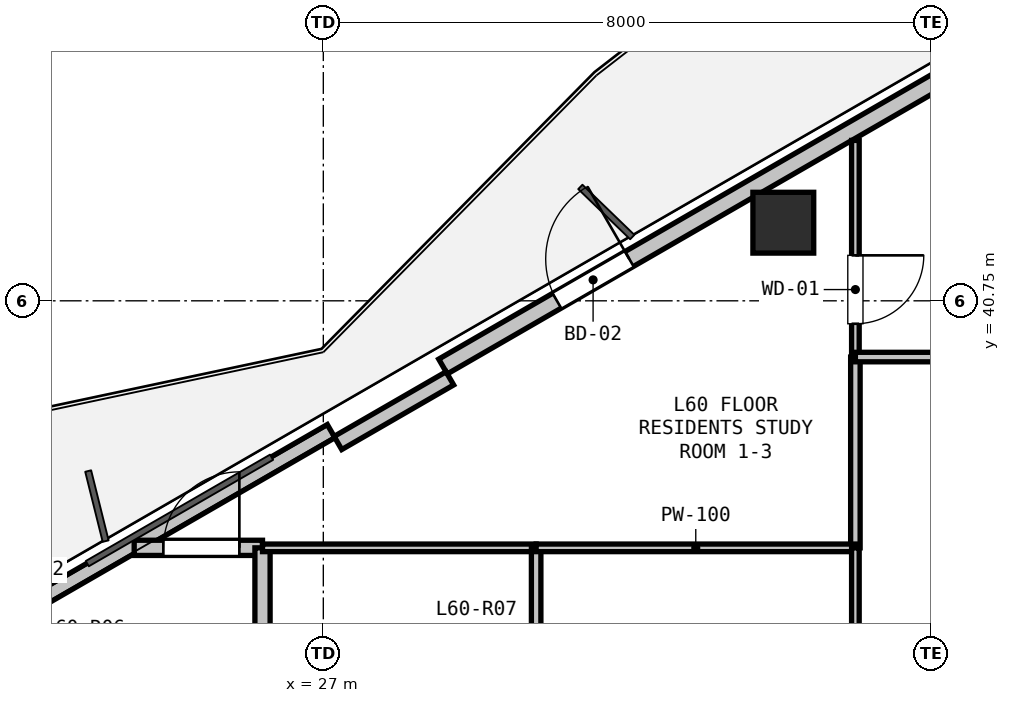
"""IFC4 building model, lengths in metres.
Left out: names, types, materials, properties, quantities, classifications, styles, units other than length and angle.
Written with IfcOpenShell. Run it as: python <this file> out.ifc"""

import sys

from ifc_helpers import new_model, si_unit, direction, frame, frame_2d, origin, origin_2d, place, context, subcontext, project, spatial, rectangle, hollow_rectangle, extrude, element, fill, save


model = new_model("IFC4")
c1 = context("Model", 3, precision=1e-05, world=origin(), true_north=direction((0.0, 1.0)))
c2 = subcontext(c1, "Body", "Model", "MODEL_VIEW")
j1 = project(units=[si_unit("LENGTHUNIT", "METRE"), si_unit("PLANEANGLEUNIT", "RADIAN")], contexts=[c1])
p1 = place(None, origin())
s1 = spatial("IfcSite", under=j1, at=p1, CompositionType="ELEMENT")
p2 = place(p1, origin())
s2 = spatial("IfcBuilding", under=s1, at=p2, CompositionType="ELEMENT")
p3 = place(p2, frame((0.0, 0.0, 215.1)))
s3 = spatial("IfcBuildingStorey", under=s2, at=p3, CompositionType="ELEMENT", Elevation=215.1)
p4 = place(p3, frame((33.052, 41.778, 0.0), z_axis=(0.0, 0.0, 1.0), x_axis=(1.0, 0.0, 0.0)))
e1 = element("IfcColumn", 1, at=p4, inside=s3, PredefinedType="COLUMN", context=c2, shape_type="SweptSolid", body=[
    extrude(hollow_rectangle(XDim=0.8, YDim=0.8, WallThickness=0.025, at=origin_2d()), origin(), (0.0, 0.0, 1.0), 3.3),
])
p5 = place(p3, frame((19.309, 34.536, 0.0), z_axis=(0.0, 0.0, 1.0), x_axis=(0.866020680503, 0.500008180874, 0.0)))
e2 = element("IfcWall", 2, at=p5, inside=s3, PredefinedType="PARAPET", context=c2, shape_type="SweptSolid", body=[
    extrude(rectangle(XDim=8.999, YDim=0.2, at=frame_2d((4.5, 0.0))), origin(), (0.0, 0.0, 1.0), 0.2),
])
p6 = place(p3, frame((28.575, 39.885, 0.0), z_axis=(0.0, 0.0, 1.0), x_axis=(0.866016233231, 0.500015883528, 0.0)))
e3 = element("IfcWall", 3, at=p6, inside=s3, PredefinedType="SOLIDWALL", context=c2, shape_type="SweptSolid", body=[
    extrude(rectangle(XDim=9.699, YDim=0.225, at=frame_2d((4.85, 0.0))), origin(), (0.0, 0.0, 1.0), 2.64),
])
p7 = place(p6, frame((1.73, 0.0, 0.0)))
e4 = element("IfcOpeningElement", 4, at=p7, cuts=e3, PredefinedType="OPENING", context=c2, shape_type="SweptSolid", body=[
    extrude(rectangle(XDim=1.1, YDim=2.1, at=frame_2d((0.55, 1.05))), frame((0.0, 0.123, 0.0), z_axis=(0.0, -1.0, 0.0), x_axis=(1.0, 0.0, 0.0)), (0.0, 0.0, 1.0), 0.245),
])
p8 = place(p3, frame((27.192, 38.88, 0.0), z_axis=(0.0, 0.0, 1.0), x_axis=(0.866025371046, 0.500000056704, 0.0)))
e5 = element("IfcWall", 5, at=p8, inside=s3, PredefinedType="PARAPET", context=c2, shape_type="SweptSolid", body=[
    extrude(rectangle(XDim=1.7, YDim=0.2, at=frame_2d((0.85, 0.0))), origin(), (0.0, 0.0, 1.0), 2.64),
])
p9 = place(p3, frame((24.512, 37.5, 0.0), z_axis=(0.0, 0.0, 1.0), x_axis=(1.0, 0.0, 0.0)))
e6 = element("IfcWall", 6, at=p9, inside=s3, PredefinedType="PARTITIONING", context=c2, shape_type="SweptSolid", body=[
    extrude(rectangle(XDim=1.688, YDim=0.2, at=frame_2d((0.844, 0.0))), origin(), (0.0, 0.0, 1.0), 2.365),
])
p10 = place(p9, frame((0.384, 0.0, 0.0)))
e7 = element("IfcOpeningElement", 7, at=p10, cuts=e6, PredefinedType="OPENING", context=c2, shape_type="SweptSolid", body=[
    extrude(rectangle(XDim=1.0, YDim=2.15, at=frame_2d((0.5, 1.075))), frame((0.0, 0.11, 0.0), z_axis=(0.0, -1.0, 0.0), x_axis=(1.0, 0.0, 0.0)), (0.0, 0.0, 1.0), 0.22),
])
p11 = place(p3, frame((26.2, 37.5, 0.0), z_axis=(0.0, 0.0, 1.0), x_axis=(0.0, -1.0, 0.0)))
e8 = element("IfcWall", 8, at=p11, inside=s3, PredefinedType="PARTITIONING", context=c2, shape_type="SweptSolid", body=[
    extrude(rectangle(XDim=2.3, YDim=0.2, at=frame_2d((1.15, 0.0))), origin(), (0.0, 0.0, 1.0), 3.02),
])
p12 = place(p3, frame((26.2, 37.5, 0.0), z_axis=(0.0, 0.0, 1.0), x_axis=(1.0, 0.0, 0.0)))
e9 = element("IfcWall", 9, at=p12, inside=s3, PredefinedType="PARTITIONING", context=c2, shape_type="SweptSolid", body=[
    extrude(rectangle(XDim=3.6, YDim=0.1, at=frame_2d((1.8, 0.0))), origin(), (0.0, 0.0, 1.0), 3.02),
])
p13 = place(p3, frame((29.8, 37.5, 0.0), z_axis=(0.0, 0.0, 1.0), x_axis=(0.0, -1.0, 0.0)))
e10 = element("IfcWall", 10, at=p13, inside=s3, PredefinedType="PARTITIONING", context=c2, shape_type="SweptSolid", body=[
    extrude(rectangle(XDim=2.3, YDim=0.125, at=frame_2d((1.15, 0.0))), origin(), (0.0, 0.0, 1.0), 3.02),
])
p14 = place(p3, frame((34.0, 42.86, 0.0), z_axis=(0.0, 0.0, 1.0), x_axis=(0.0, -1.0, 0.0)))
e11 = element("IfcWall", 11, at=p14, inside=s3, PredefinedType="PARTITIONING", context=c2, shape_type="SweptSolid", body=[
    extrude(rectangle(XDim=2.85, YDim=0.1, at=frame_2d((1.425, 0.0))), origin(), (0.0, 0.0, 1.0), 2.745),
])
p15 = place(p14, frame((1.512, 0.0, 0.0)))
e12 = element("IfcOpeningElement", 12, at=p15, cuts=e11, PredefinedType="OPENING", context=c2, shape_type="SweptSolid", body=[
    extrude(rectangle(XDim=0.9, YDim=2.1, at=frame_2d((0.45, 1.05))), frame((0.0, 0.06, 0.0), z_axis=(0.0, -1.0, 0.0), x_axis=(1.0, 0.0, 0.0)), (0.0, 0.0, 1.0), 0.12),
])
p16 = place(p3, frame((34.0, 40.01, 0.0), z_axis=(0.0, 0.0, 1.0), x_axis=(0.0, -1.0, 0.0)))
e13 = element("IfcWall", 13, at=p16, inside=s3, PredefinedType="PARTITIONING", context=c2, shape_type="SweptSolid", body=[
    extrude(rectangle(XDim=2.51, YDim=0.125, at=frame_2d((1.255, 0.0))), origin(), (0.0, 0.0, 1.0), 3.02),
])
p17 = place(p3, frame((34.0, 37.5, 0.0), z_axis=(0.0, 0.0, 1.0), x_axis=(-1.0, 0.0, 0.0)))
e14 = element("IfcWall", 14, at=p17, inside=s3, PredefinedType="PARTITIONING", context=c2, shape_type="SweptSolid", body=[
    extrude(rectangle(XDim=4.2, YDim=0.1, at=frame_2d((2.1, 0.0))), origin(), (0.0, 0.0, 1.0), 3.02),
])
p18 = place(p3, frame((34.0, 35.2, 0.0), z_axis=(0.0, 0.0, 1.0), x_axis=(0.0, 1.0, 0.0)))
e15 = element("IfcWall", 15, at=p18, inside=s3, PredefinedType="PARTITIONING", context=c2, shape_type="SweptSolid", body=[
    extrude(rectangle(XDim=2.3, YDim=0.1, at=frame_2d((1.15, 0.0))), origin(), (0.0, 0.0, 1.0), 3.02),
])
p19 = place(p3, frame((34.0, 40.01, 0.0), z_axis=(0.0, 0.0, 1.0), x_axis=(1.0, 0.0, 0.0)))
e16 = element("IfcWall", 16, at=p19, inside=s3, PredefinedType="PARTITIONING", context=c2, shape_type="SweptSolid", body=[
    extrude(rectangle(XDim=6.452, YDim=0.125, at=frame_2d((3.226, 0.0))), origin(), (0.0, 0.0, 1.0), 2.468),
])
p20 = place(p7, origin())
e17 = element("IfcDoor", 17, at=p20, inside=s3, OperationType="SINGLE_SWING_RIGHT", PredefinedType="DOOR", context=c2, shape_type="SweptSolid", body=[
    extrude(rectangle(XDim=1.1, YDim=2.1, at=frame_2d((0.55, 1.05))), frame((0.0, 0.025, 0.0), z_axis=(0.0, -1.0, 0.0), x_axis=(1.0, 0.0, 0.0)), (0.0, 0.0, 1.0), 0.05),
])
fill(e4, e17)
p21 = place(p10, origin())
e18 = element("IfcDoor", 18, at=p21, inside=s3, OperationType="SINGLE_SWING_RIGHT", PredefinedType="DOOR", context=c2, shape_type="SweptSolid", body=[
    extrude(rectangle(XDim=1.0, YDim=2.15, at=frame_2d((0.5, 1.075))), frame((0.0, 0.025, 0.0), z_axis=(0.0, -1.0, 0.0), x_axis=(1.0, 0.0, 0.0)), (0.0, 0.0, 1.0), 0.05),
])
fill(e7, e18)
p22 = place(p15, origin())
e19 = element("IfcDoor", 19, at=p22, inside=s3, OperationType="SINGLE_SWING_LEFT", PredefinedType="DOOR", context=c2, shape_type="SweptSolid", body=[
    extrude(rectangle(XDim=0.9, YDim=2.1, at=frame_2d((0.45, 1.05))), frame((0.0, 0.025, 0.0), z_axis=(0.0, -1.0, 0.0), x_axis=(1.0, 0.0, 0.0)), (0.0, 0.0, 1.0), 0.05),
])
fill(e12, e19)
save(model, sys.argv[1])
